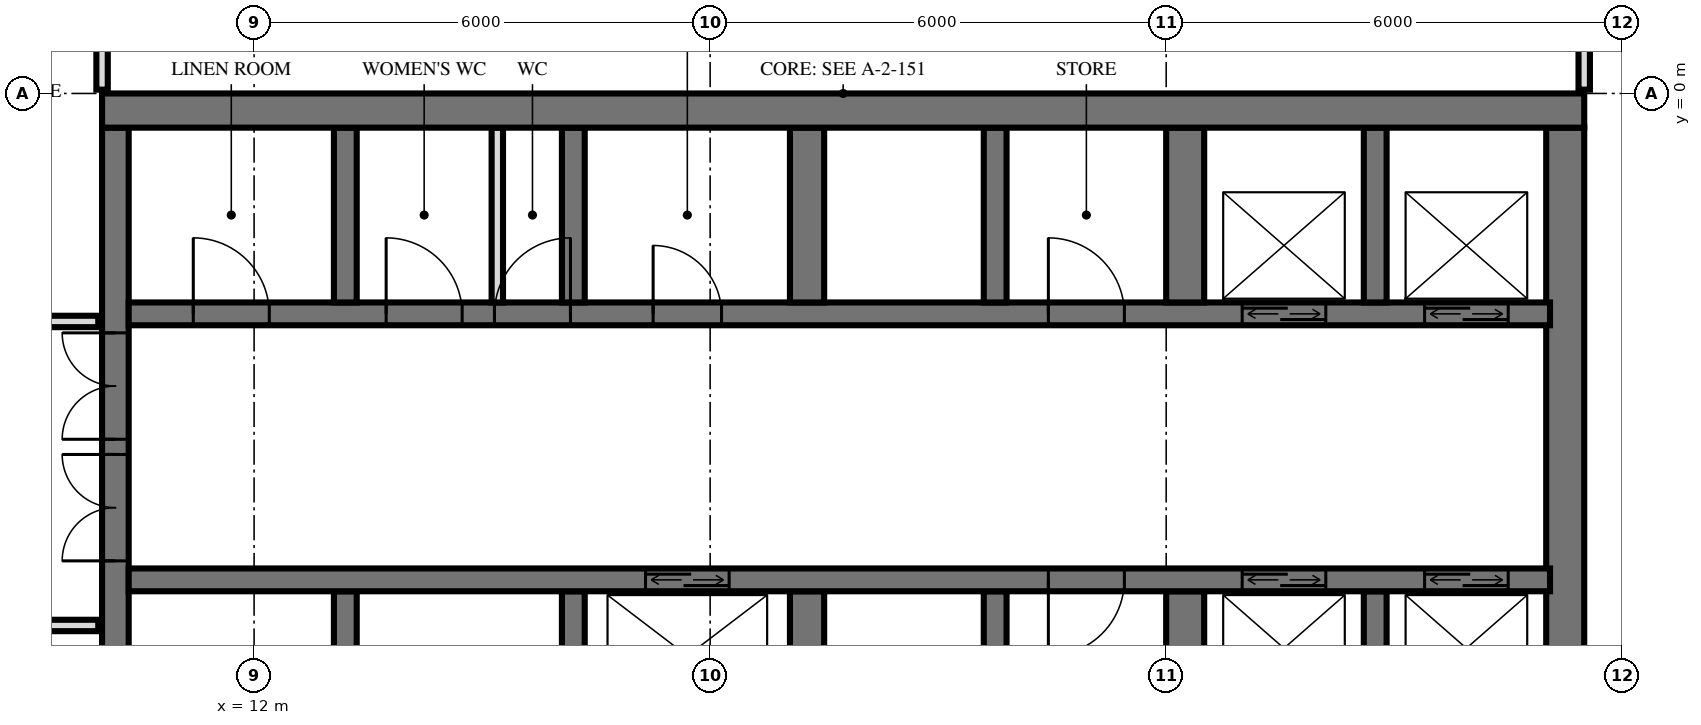
"""IFC4 building model, lengths in metres.
Left out: names, types, materials, properties, quantities, classifications, styles, units other than length and angle.
Written with IfcOpenShell. Run it as: python <this file> out.ifc"""

import sys

from ifc_helpers import new_model, si_unit, direction, frame, frame_2d, origin, place, context, subcontext, project, spatial, rectangle, extrude, element, fill, save


model = new_model("IFC4")
c1 = context("Model", 3, precision=1e-05, world=origin(), true_north=direction((0.0, 1.0)))
c2 = subcontext(c1, "Body", "Model", "MODEL_VIEW")
j1 = project(units=[si_unit("LENGTHUNIT", "METRE"), si_unit("PLANEANGLEUNIT", "RADIAN")], contexts=[c1])
p1 = place(None, origin())
s1 = spatial("IfcSite", under=j1, at=p1, CompositionType="ELEMENT")
p2 = place(p1, origin())
s2 = spatial("IfcBuilding", under=s1, at=p2, CompositionType="ELEMENT")
p3 = place(p2, frame((0.0, 0.0, 85.2)))
s3 = spatial("IfcBuildingStorey", under=s2, at=p3, CompositionType="ELEMENT", Elevation=85.2)
p4 = place(p3, frame((10.0, -0.225, 0.0), z_axis=(0.0, 0.0, 1.0), x_axis=(1.0, 0.0, 0.0)))
e1 = element("IfcWall", 1, at=p4, inside=s3, PredefinedType="SHEAR", context=c2, shape_type="SweptSolid", body=[
    extrude(rectangle(XDim=19.5, YDim=0.45, at=frame_2d((9.75, 0.0))), origin(), (0.0, 0.0, 1.0), 3.6),
])
p5 = place(p3, frame((10.175, -14.55, 0.0), z_axis=(0.0, 0.0, 1.0), x_axis=(0.0, 1.0, 0.0)))
e2 = element("IfcWall", 2, at=p5, inside=s3, PredefinedType="SHEAR", context=c2, shape_type="SweptSolid", body=[
    extrude(rectangle(XDim=14.1, YDim=0.35, at=frame_2d((7.05, 0.0))), origin(), (0.0, 0.0, 1.0), 3.6),
])
p6 = place(p5, frame((8.4, 0.0, 0.0)))
e3 = element("IfcOpeningElement", 3, at=p6, cuts=e2, PredefinedType="OPENING", context=c2, shape_type="SweptSolid", body=[
    extrude(rectangle(XDim=1.4, YDim=2.4, at=frame_2d((0.7, 1.2))), frame((0.0, 0.185, 0.0), z_axis=(0.0, -1.0, 0.0), x_axis=(1.0, 0.0, 0.0)), (0.0, 0.0, 1.0), 0.37),
])
p7 = place(p5, frame((10.0, 0.0, 0.0)))
e4 = element("IfcOpeningElement", 4, at=p7, cuts=e2, PredefinedType="OPENING", context=c2, shape_type="SweptSolid", body=[
    extrude(rectangle(XDim=1.4, YDim=2.4, at=frame_2d((0.7, 1.2))), frame((0.0, 0.185, 0.0), z_axis=(0.0, -1.0, 0.0), x_axis=(1.0, 0.0, 0.0)), (0.0, 0.0, 1.0), 0.37),
])
p8 = place(p5, frame((4.0, 0.0, 0.0)))
e5 = element("IfcOpeningElement", 5, at=p8, cuts=e2, PredefinedType="OPENING", context=c2, shape_type="SweptSolid", body=[
    extrude(rectangle(XDim=1.2, YDim=2.1, at=frame_2d((0.6, 1.05))), frame((0.0, 0.185, 0.0), z_axis=(0.0, -1.0, 0.0), x_axis=(1.0, 0.0, 0.0)), (0.0, 0.0, 1.0), 0.37),
])
p9 = place(p3, frame((29.25, -14.55, 0.0), z_axis=(0.0, 0.0, 1.0), x_axis=(0.0, 1.0, 0.0)))
e6 = element("IfcWall", 6, at=p9, inside=s3, PredefinedType="SHEAR", context=c2, shape_type="SweptSolid", body=[
    extrude(rectangle(XDim=14.1, YDim=0.5, at=frame_2d((7.05, 0.0))), origin(), (0.0, 0.0, 1.0), 3.6),
])
p10 = place(p3, frame((10.35, -2.9, 0.0), z_axis=(0.0, 0.0, 1.0), x_axis=(1.0, 0.0, 0.0)))
e7 = element("IfcWall", 7, at=p10, inside=s3, PredefinedType="SHEAR", context=c2, shape_type="SweptSolid", body=[
    extrude(rectangle(XDim=18.7, YDim=0.3, at=frame_2d((9.35, 0.0))), origin(), (0.0, 0.0, 1.0), 3.6),
])
p11 = place(p10, frame((14.65, 0.0, 0.0)))
e8 = element("IfcOpeningElement", 8, at=p11, cuts=e7, PredefinedType="OPENING", context=c2, shape_type="SweptSolid", body=[
    extrude(rectangle(XDim=1.1, YDim=2.1, at=frame_2d((0.55, 1.05))), frame((0.0, 0.16, 0.0), z_axis=(0.0, -1.0, 0.0), x_axis=(1.0, 0.0, 0.0)), (0.0, 0.0, 1.0), 0.32),
])
p12 = place(p10, frame((17.05, 0.0, 0.0)))
e9 = element("IfcOpeningElement", 9, at=p12, cuts=e7, PredefinedType="OPENING", context=c2, shape_type="SweptSolid", body=[
    extrude(rectangle(XDim=1.1, YDim=2.1, at=frame_2d((0.55, 1.05))), frame((0.0, 0.16, 0.0), z_axis=(0.0, -1.0, 0.0), x_axis=(1.0, 0.0, 0.0)), (0.0, 0.0, 1.0), 0.32),
])
p13 = place(p10, frame((6.9, 0.0, 0.0)))
e10 = element("IfcOpeningElement", 10, at=p13, cuts=e7, PredefinedType="OPENING", context=c2, shape_type="SweptSolid", body=[
    extrude(rectangle(XDim=0.9, YDim=2.1, at=frame_2d((0.45, 1.05))), frame((0.0, 0.16, 0.0), z_axis=(0.0, -1.0, 0.0), x_axis=(1.0, 0.0, 0.0)), (0.0, 0.0, 1.0), 0.32),
])
p14 = place(p10, frame((0.85, 0.0, 0.0)))
e11 = element("IfcOpeningElement", 11, at=p14, cuts=e7, PredefinedType="OPENING", context=c2, shape_type="SweptSolid", body=[
    extrude(rectangle(XDim=1.0, YDim=2.1, at=frame_2d((0.5, 1.05))), frame((0.0, 0.16, 0.0), z_axis=(0.0, -1.0, 0.0), x_axis=(1.0, 0.0, 0.0)), (0.0, 0.0, 1.0), 0.32),
])
p15 = place(p10, frame((3.387, 0.0, 0.0)))
e12 = element("IfcOpeningElement", 12, at=p15, cuts=e7, PredefinedType="OPENING", context=c2, shape_type="SweptSolid", body=[
    extrude(rectangle(XDim=1.0, YDim=2.1, at=frame_2d((0.5, 1.05))), frame((0.0, 0.16, 0.0), z_axis=(0.0, -1.0, 0.0), x_axis=(1.0, 0.0, 0.0)), (0.0, 0.0, 1.0), 0.32),
])
p16 = place(p10, frame((4.812, 0.0, 0.0)))
e13 = element("IfcOpeningElement", 13, at=p16, cuts=e7, PredefinedType="OPENING", context=c2, shape_type="SweptSolid", body=[
    extrude(rectangle(XDim=1.0, YDim=2.1, at=frame_2d((0.5, 1.05))), frame((0.0, 0.16, 0.0), z_axis=(0.0, -1.0, 0.0), x_axis=(1.0, 0.0, 0.0)), (0.0, 0.0, 1.0), 0.32),
])
p17 = place(p10, frame((12.1, 0.0, 0.0)))
e14 = element("IfcOpeningElement", 14, at=p17, cuts=e7, PredefinedType="OPENING", context=c2, shape_type="SweptSolid", body=[
    extrude(rectangle(XDim=1.0, YDim=2.1, at=frame_2d((0.5, 1.05))), frame((0.0, 0.16, 0.0), z_axis=(0.0, -1.0, 0.0), x_axis=(1.0, 0.0, 0.0)), (0.0, 0.0, 1.0), 0.32),
])
p18 = place(p3, frame((10.35, -6.4, 0.0), z_axis=(0.0, 0.0, 1.0), x_axis=(1.0, 0.0, 0.0)))
e15 = element("IfcWall", 15, at=p18, inside=s3, PredefinedType="SHEAR", context=c2, shape_type="SweptSolid", body=[
    extrude(rectangle(XDim=18.7, YDim=0.3, at=frame_2d((9.35, 0.0))), origin(), (0.0, 0.0, 1.0), 3.6),
])
p19 = place(p18, frame((14.65, 0.0, 0.0)))
e16 = element("IfcOpeningElement", 16, at=p19, cuts=e15, PredefinedType="OPENING", context=c2, shape_type="SweptSolid", body=[
    extrude(rectangle(XDim=1.1, YDim=2.1, at=frame_2d((0.55, 1.05))), frame((0.0, 0.16, 0.0), z_axis=(0.0, -1.0, 0.0), x_axis=(1.0, 0.0, 0.0)), (0.0, 0.0, 1.0), 0.32),
])
p20 = place(p18, frame((17.05, 0.0, 0.0)))
e17 = element("IfcOpeningElement", 17, at=p20, cuts=e15, PredefinedType="OPENING", context=c2, shape_type="SweptSolid", body=[
    extrude(rectangle(XDim=1.1, YDim=2.1, at=frame_2d((0.55, 1.05))), frame((0.0, 0.16, 0.0), z_axis=(0.0, -1.0, 0.0), x_axis=(1.0, 0.0, 0.0)), (0.0, 0.0, 1.0), 0.32),
])
p21 = place(p18, frame((6.8, 0.0, 0.0)))
e18 = element("IfcOpeningElement", 18, at=p21, cuts=e15, PredefinedType="OPENING", context=c2, shape_type="SweptSolid", body=[
    extrude(rectangle(XDim=1.1, YDim=2.1, at=frame_2d((0.55, 1.05))), frame((0.0, 0.16, 0.0), z_axis=(0.0, -1.0, 0.0), x_axis=(1.0, 0.0, 0.0)), (0.0, 0.0, 1.0), 0.32),
])
p22 = place(p18, frame((12.1, 0.0, 0.0)))
e19 = element("IfcOpeningElement", 19, at=p22, cuts=e15, PredefinedType="OPENING", context=c2, shape_type="SweptSolid", body=[
    extrude(rectangle(XDim=1.0, YDim=2.1, at=frame_2d((0.5, 1.05))), frame((0.0, 0.16, 0.0), z_axis=(0.0, -1.0, 0.0), x_axis=(1.0, 0.0, 0.0)), (0.0, 0.0, 1.0), 0.32),
])
for number, where, z_axis, x_axis in (
    (20, (13.2, -2.75, 0.0), (0.0, 0.0, 1.0), (0.0, 1.0, 0.0)),
    (21, (13.2, -8.85, 0.0), (0.0, 0.0, 1.0), (0.0, 1.0, 0.0)),
    (22, (16.2, -2.75, 0.0), (0.0, 0.0, 1.0), (0.0, 1.0, 0.0)),
    (23, (16.2, -8.85, 0.0), (0.0, 0.0, 1.0), (0.0, 1.0, 0.0)),
):
    element("IfcWall", number, at=place(p3, frame(where, z_axis=z_axis, x_axis=x_axis)), inside=s3, PredefinedType="SHEAR", context=c2, shape_type="SweptSolid", body=[
        extrude(rectangle(XDim=2.3, YDim=0.3, at=frame_2d((1.15, 0.0))), origin(), (0.0, 0.0, 1.0), 3.6),
    ])
for number, where, z_axis, x_axis in (
    (24, (19.275, -2.75, 0.0), (0.0, 0.0, 1.0), (0.0, 1.0, 0.0)),
    (25, (19.275, -8.85, 0.0), (0.0, 0.0, 1.0), (0.0, 1.0, 0.0)),
):
    element("IfcWall", number, at=place(p3, frame(where, z_axis=z_axis, x_axis=x_axis)), inside=s3, PredefinedType="SHEAR", context=c2, shape_type="SweptSolid", body=[
        extrude(rectangle(XDim=2.3, YDim=0.45, at=frame_2d((1.15, 0.0))), origin(), (0.0, 0.0, 1.0), 3.6),
    ])
for number, where, z_axis, x_axis in (
    (26, (21.75, -2.75, 0.0), (0.0, 0.0, 1.0), (0.0, 1.0, 0.0)),
    (27, (21.75, -8.85, 0.0), (0.0, 0.0, 1.0), (0.0, 1.0, 0.0)),
):
    element("IfcWall", number, at=place(p3, frame(where, z_axis=z_axis, x_axis=x_axis)), inside=s3, PredefinedType="SHEAR", context=c2, shape_type="SweptSolid", body=[
        extrude(rectangle(XDim=2.3, YDim=0.3, at=frame_2d((1.15, 0.0))), origin(), (0.0, 0.0, 1.0), 3.6),
    ])
for number, where, z_axis, x_axis in (
    (28, (24.25, -2.75, 0.0), (0.0, 0.0, 1.0), (0.0, 1.0, 0.0)),
    (29, (24.25, -8.85, 0.0), (0.0, 0.0, 1.0), (0.0, 1.0, 0.0)),
):
    element("IfcWall", number, at=place(p3, frame(where, z_axis=z_axis, x_axis=x_axis)), inside=s3, PredefinedType="SHEAR", context=c2, shape_type="SweptSolid", body=[
        extrude(rectangle(XDim=2.3, YDim=0.5, at=frame_2d((1.15, 0.0))), origin(), (0.0, 0.0, 1.0), 3.6),
    ])
for number, where, z_axis, x_axis in (
    (30, (26.75, -2.75, 0.0), (0.0, 0.0, 1.0), (0.0, 1.0, 0.0)),
    (31, (26.75, -8.85, 0.0), (0.0, 0.0, 1.0), (0.0, 1.0, 0.0)),
):
    element("IfcWall", number, at=place(p3, frame(where, z_axis=z_axis, x_axis=x_axis)), inside=s3, PredefinedType="SHEAR", context=c2, shape_type="SweptSolid", body=[
        extrude(rectangle(XDim=2.3, YDim=0.3, at=frame_2d((1.15, 0.0))), origin(), (0.0, 0.0, 1.0), 3.6),
    ])
p23 = place(p3, frame((15.2, -2.75, 0.0), z_axis=(0.0, 0.0, 1.0), x_axis=(0.0, 1.0, 0.0)))
e32 = element("IfcWall", 32, at=p23, inside=s3, PredefinedType="PARTITIONING", context=c2, shape_type="SweptSolid", body=[
    extrude(rectangle(XDim=2.3, YDim=0.15, at=frame_2d((1.15, 0.0))), origin(), (0.0, 0.0, 1.0), 3.3),
])
p24 = place(p3, frame((29.5, 0.05, 0.0), z_axis=(0.0, 0.0, 1.0), x_axis=(0.0, 1.0, 0.0)))
e33 = element("IfcWall", 33, at=p24, inside=s3, PredefinedType="PARTITIONING", context=c2, shape_type="SweptSolid", body=[
    extrude(rectangle(XDim=0.827, YDim=0.15, at=frame_2d((0.414, 0.0))), origin(), (0.0, 0.0, 1.0), 3.32),
])
p25 = place(p3, frame((10.0, 0.05, 0.0), z_axis=(0.0, 0.0, 1.0), x_axis=(0.0, 1.0, 0.0)))
e34 = element("IfcWall", 34, at=p25, inside=s3, PredefinedType="PLUMBINGWALL", context=c2, shape_type="SweptSolid", body=[
    extrude(rectangle(XDim=0.97, YDim=0.15, at=frame_2d((0.485, 0.0))), origin(), (0.0, 0.0, 1.0), 3.32),
])
p26 = place(p3, frame((-9.95, -7.0, 0.0), z_axis=(0.0, 0.0, 1.0), x_axis=(1.0, 0.0, 0.0)))
e35 = element("IfcWall", 35, at=p26, inside=s3, PredefinedType="PARTITIONING", context=c2, shape_type="SweptSolid", body=[
    extrude(rectangle(XDim=19.9, YDim=0.15, at=frame_2d((9.95, 0.0))), origin(), (0.0, 0.0, 1.0), 3.32),
])
p27 = place(p26, frame((9.45, 0.0, 0.0)))
e36 = element("IfcOpeningElement", 36, at=p27, cuts=e35, PredefinedType="OPENING", context=c2, shape_type="SweptSolid", body=[
    extrude(rectangle(XDim=1.0, YDim=2.1, at=frame_2d((0.5, 1.05))), frame((0.0, 0.085, 0.0), z_axis=(0.0, -1.0, 0.0), x_axis=(1.0, 0.0, 0.0)), (0.0, 0.0, 1.0), 0.17),
])
p28 = place(p26, frame((15.45, 0.0, 0.0)))
e37 = element("IfcOpeningElement", 37, at=p28, cuts=e35, PredefinedType="OPENING", context=c2, shape_type="SweptSolid", body=[
    extrude(rectangle(XDim=1.0, YDim=2.1, at=frame_2d((0.5, 1.05))), frame((0.0, 0.085, 0.0), z_axis=(0.0, -1.0, 0.0), x_axis=(1.0, 0.0, 0.0)), (0.0, 0.0, 1.0), 0.17),
])
p29 = place(p3, frame((-9.95, -3.0, 0.0), z_axis=(0.0, 0.0, 1.0), x_axis=(1.0, 0.0, 0.0)))
e38 = element("IfcWall", 38, at=p29, inside=s3, PredefinedType="PARTITIONING", context=c2, shape_type="SweptSolid", body=[
    extrude(rectangle(XDim=19.9, YDim=0.15, at=frame_2d((9.95, 0.0))), origin(), (0.0, 0.0, 1.0), 3.32),
])
p30 = place(p29, frame((2.2, 0.0, 0.0)))
e39 = element("IfcOpeningElement", 39, at=p30, cuts=e38, PredefinedType="OPENING", context=c2, shape_type="SweptSolid", body=[
    extrude(rectangle(XDim=1.0, YDim=2.1, at=frame_2d((0.5, 1.05))), frame((0.0, 0.085, 0.0), z_axis=(0.0, -1.0, 0.0), x_axis=(1.0, 0.0, 0.0)), (0.0, 0.0, 1.0), 0.17),
])
p31 = place(p29, frame((7.2, 0.0, 0.0)))
e40 = element("IfcOpeningElement", 40, at=p31, cuts=e38, PredefinedType="OPENING", context=c2, shape_type="SweptSolid", body=[
    extrude(rectangle(XDim=1.0, YDim=2.1, at=frame_2d((0.5, 1.05))), frame((0.0, 0.085, 0.0), z_axis=(0.0, -1.0, 0.0), x_axis=(1.0, 0.0, 0.0)), (0.0, 0.0, 1.0), 0.17),
])
p32 = place(p29, frame((11.7, 0.0, 0.0)))
e41 = element("IfcOpeningElement", 41, at=p32, cuts=e38, PredefinedType="OPENING", context=c2, shape_type="SweptSolid", body=[
    extrude(rectangle(XDim=1.0, YDim=2.1, at=frame_2d((0.5, 1.05))), frame((0.0, 0.085, 0.0), z_axis=(0.0, -1.0, 0.0), x_axis=(1.0, 0.0, 0.0)), (0.0, 0.0, 1.0), 0.17),
])
p33 = place(p29, frame((15.45, 0.0, 0.0)))
e42 = element("IfcOpeningElement", 42, at=p33, cuts=e38, PredefinedType="OPENING", context=c2, shape_type="SweptSolid", body=[
    extrude(rectangle(XDim=1.0, YDim=2.1, at=frame_2d((0.5, 1.05))), frame((0.0, 0.085, 0.0), z_axis=(0.0, -1.0, 0.0), x_axis=(1.0, 0.0, 0.0)), (0.0, 0.0, 1.0), 0.17),
])
p34 = place(p29, frame((18.2, 0.0, 0.0)))
e43 = element("IfcOpeningElement", 43, at=p34, cuts=e38, PredefinedType="OPENING", context=c2, shape_type="SweptSolid", body=[
    extrude(rectangle(XDim=1.0, YDim=2.1, at=frame_2d((0.5, 1.05))), frame((0.0, 0.085, 0.0), z_axis=(0.0, -1.0, 0.0), x_axis=(1.0, 0.0, 0.0)), (0.0, 0.0, 1.0), 0.17),
])
p35 = place(p11, origin())
e44 = element("IfcDoor", 44, at=p35, inside=s3, OperationType="DOUBLE_DOOR_SLIDING", PredefinedType="USERDEFINED", context=c2, shape_type="SweptSolid", body=[
    extrude(rectangle(XDim=1.1, YDim=2.1, at=frame_2d((0.55, 1.05))), frame((0.0, 0.025, 0.0), z_axis=(0.0, -1.0, 0.0), x_axis=(1.0, 0.0, 0.0)), (0.0, 0.0, 1.0), 0.05),
])
fill(e8, e44)
p36 = place(p12, origin())
e45 = element("IfcDoor", 45, at=p36, inside=s3, OperationType="DOUBLE_DOOR_SLIDING", PredefinedType="USERDEFINED", context=c2, shape_type="SweptSolid", body=[
    extrude(rectangle(XDim=1.1, YDim=2.1, at=frame_2d((0.55, 1.05))), frame((0.0, 0.025, 0.0), z_axis=(0.0, -1.0, 0.0), x_axis=(1.0, 0.0, 0.0)), (0.0, 0.0, 1.0), 0.05),
])
fill(e9, e45)
p37 = place(p19, origin())
e46 = element("IfcDoor", 46, at=p37, inside=s3, OperationType="DOUBLE_DOOR_SLIDING", PredefinedType="USERDEFINED", context=c2, shape_type="SweptSolid", body=[
    extrude(rectangle(XDim=1.1, YDim=2.1, at=frame_2d((0.55, 1.05))), frame((0.0, 0.025, 0.0), z_axis=(0.0, -1.0, 0.0), x_axis=(1.0, 0.0, 0.0)), (0.0, 0.0, 1.0), 0.05),
])
fill(e16, e46)
p38 = place(p20, origin())
e47 = element("IfcDoor", 47, at=p38, inside=s3, OperationType="DOUBLE_DOOR_SLIDING", PredefinedType="USERDEFINED", context=c2, shape_type="SweptSolid", body=[
    extrude(rectangle(XDim=1.1, YDim=2.1, at=frame_2d((0.55, 1.05))), frame((0.0, 0.025, 0.0), z_axis=(0.0, -1.0, 0.0), x_axis=(1.0, 0.0, 0.0)), (0.0, 0.0, 1.0), 0.05),
])
fill(e17, e47)
p39 = place(p21, origin())
e48 = element("IfcDoor", 48, at=p39, inside=s3, OperationType="DOUBLE_DOOR_SLIDING", PredefinedType="USERDEFINED", context=c2, shape_type="SweptSolid", body=[
    extrude(rectangle(XDim=1.1, YDim=2.1, at=frame_2d((0.55, 1.05))), frame((0.0, 0.025, 0.0), z_axis=(0.0, -1.0, 0.0), x_axis=(1.0, 0.0, 0.0)), (0.0, 0.0, 1.0), 0.05),
])
fill(e18, e48)
p40 = place(p6, origin())
e49 = element("IfcDoor", 49, at=p40, inside=s3, OperationType="DOUBLE_DOOR_SINGLE_SWING", PredefinedType="DOOR", context=c2, shape_type="SweptSolid", body=[
    extrude(rectangle(XDim=1.4, YDim=2.4, at=frame_2d((0.7, 1.2))), frame((0.0, 0.025, 0.0), z_axis=(0.0, -1.0, 0.0), x_axis=(1.0, 0.0, 0.0)), (0.0, 0.0, 1.0), 0.05),
])
fill(e3, e49)
p41 = place(p7, origin())
e50 = element("IfcDoor", 50, at=p41, inside=s3, OperationType="DOUBLE_DOOR_SINGLE_SWING", PredefinedType="DOOR", context=c2, shape_type="SweptSolid", body=[
    extrude(rectangle(XDim=1.4, YDim=2.4, at=frame_2d((0.7, 1.2))), frame((0.0, 0.025, 0.0), z_axis=(0.0, -1.0, 0.0), x_axis=(1.0, 0.0, 0.0)), (0.0, 0.0, 1.0), 0.05),
])
fill(e4, e50)
p42 = place(p13, origin())
e51 = element("IfcDoor", 51, at=p42, inside=s3, OperationType="SINGLE_SWING_RIGHT", PredefinedType="DOOR", context=c2, shape_type="SweptSolid", body=[
    extrude(rectangle(XDim=0.9, YDim=2.1, at=frame_2d((0.45, 1.05))), frame((0.0, 0.025, 0.0), z_axis=(0.0, -1.0, 0.0), x_axis=(1.0, 0.0, 0.0)), (0.0, 0.0, 1.0), 0.05),
])
fill(e10, e51)
p43 = place(p14, origin())
e52 = element("IfcDoor", 52, at=p43, inside=s3, OperationType="SINGLE_SWING_RIGHT", PredefinedType="DOOR", context=c2, shape_type="SweptSolid", body=[
    extrude(rectangle(XDim=1.0, YDim=2.1, at=frame_2d((0.5, 1.05))), frame((0.0, 0.025, 0.0), z_axis=(0.0, -1.0, 0.0), x_axis=(1.0, 0.0, 0.0)), (0.0, 0.0, 1.0), 0.05),
])
fill(e11, e52)
p44 = place(p15, origin())
e53 = element("IfcDoor", 53, at=p44, inside=s3, OperationType="SINGLE_SWING_RIGHT", PredefinedType="DOOR", context=c2, shape_type="SweptSolid", body=[
    extrude(rectangle(XDim=1.0, YDim=2.1, at=frame_2d((0.5, 1.05))), frame((0.0, 0.025, 0.0), z_axis=(0.0, -1.0, 0.0), x_axis=(1.0, 0.0, 0.0)), (0.0, 0.0, 1.0), 0.05),
])
fill(e12, e53)
p45 = place(p16, origin())
e54 = element("IfcDoor", 54, at=p45, inside=s3, OperationType="SINGLE_SWING_LEFT", PredefinedType="DOOR", context=c2, shape_type="SweptSolid", body=[
    extrude(rectangle(XDim=1.0, YDim=2.1, at=frame_2d((0.5, 1.05))), frame((0.0, 0.025, 0.0), z_axis=(0.0, -1.0, 0.0), x_axis=(1.0, 0.0, 0.0)), (0.0, 0.0, 1.0), 0.05),
])
fill(e13, e54)
p46 = place(p17, origin())
e55 = element("IfcDoor", 55, at=p46, inside=s3, OperationType="SINGLE_SWING_RIGHT", PredefinedType="DOOR", context=c2, shape_type="SweptSolid", body=[
    extrude(rectangle(XDim=1.0, YDim=2.1, at=frame_2d((0.5, 1.05))), frame((0.0, 0.025, 0.0), z_axis=(0.0, -1.0, 0.0), x_axis=(1.0, 0.0, 0.0)), (0.0, 0.0, 1.0), 0.05),
])
fill(e14, e55)
p47 = place(p22, frame((0.5, 0.0, 0.0), z_axis=(0.0, 0.0, 1.0), x_axis=(-1.0, 0.0, 0.0)))
e56 = element("IfcDoor", 56, at=p47, inside=s3, OperationType="SINGLE_SWING_LEFT", PredefinedType="DOOR", context=c2, shape_type="SweptSolid", body=[
    extrude(rectangle(XDim=1.0, YDim=2.1, at=frame_2d((0.0, 1.05))), frame((0.0, -0.025, 0.0), z_axis=(0.0, 1.0, 0.0), x_axis=(-1.0, 0.0, 0.0)), (0.0, 0.0, 1.0), 0.05),
])
fill(e19, e56)
save(model, sys.argv[1])
